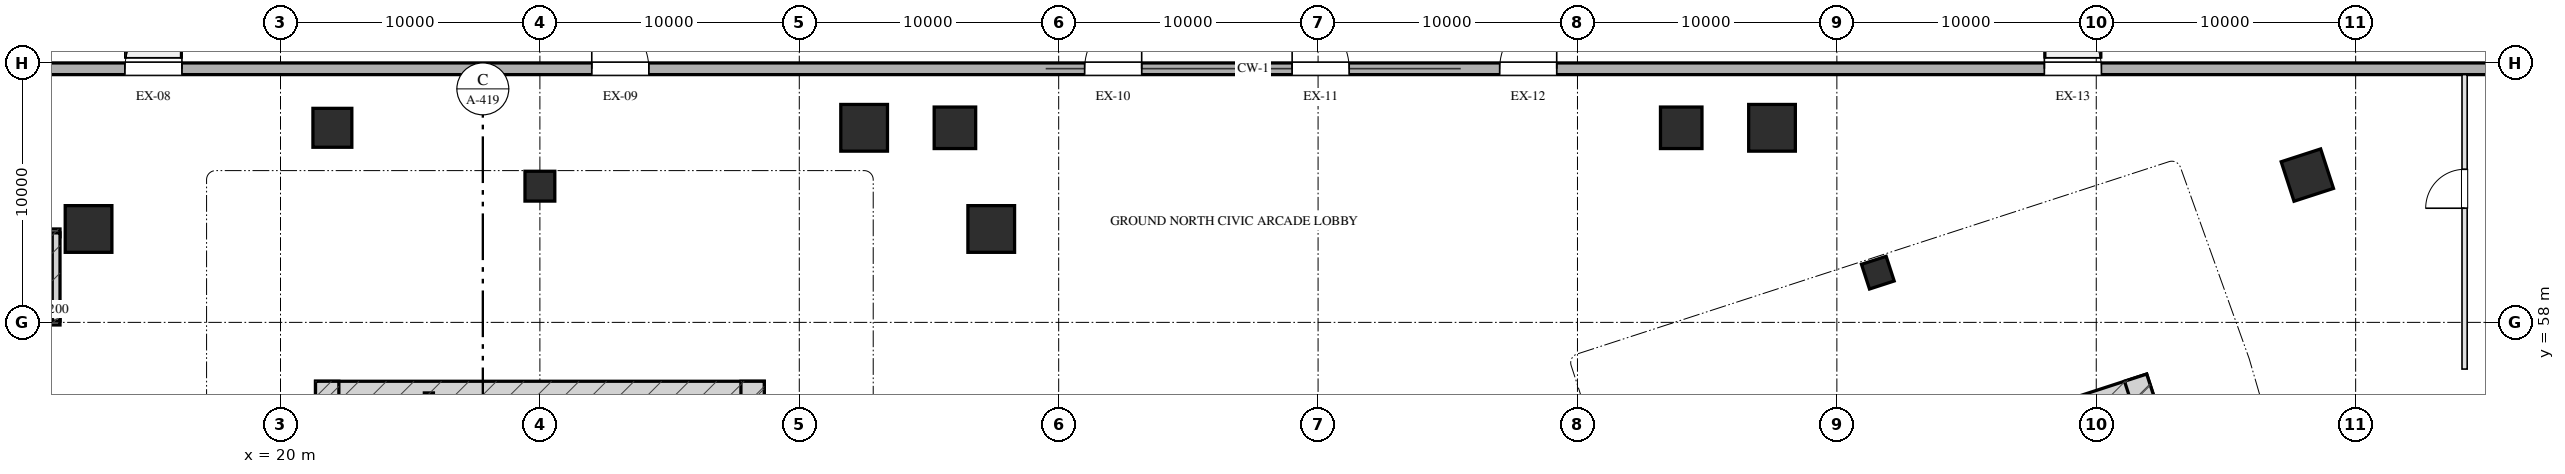
"""IFC4 building model, lengths in metres.
Left out: names, types, materials, properties, quantities, classifications, styles, units other than length and angle.
Written with IfcOpenShell. Run it as: python <this file> out.ifc"""

import sys

from ifc_helpers import new_model, si_unit, direction, frame, frame_2d, origin, origin_2d, place, context, subcontext, project, spatial, rectangle, hollow_rectangle, extrude, element, fill, save


model = new_model("IFC4")
c1 = context("Model", 3, precision=1e-05, world=origin(), true_north=direction((0.0, 1.0)))
c2 = subcontext(c1, "Body", "Model", "MODEL_VIEW")
j1 = project(units=[si_unit("LENGTHUNIT", "METRE"), si_unit("PLANEANGLEUNIT", "RADIAN")], contexts=[c1])
p1 = place(None, origin())
s1 = spatial("IfcSite", under=j1, at=p1, CompositionType="ELEMENT")
p2 = place(p1, origin())
s2 = spatial("IfcBuilding", under=s1, at=p2, CompositionType="ELEMENT")
p3 = place(p2, origin())
s3 = spatial("IfcBuildingStorey", under=s2, at=p3, CompositionType="ELEMENT", Elevation=0.0)
p4 = place(p3, frame((21.35, 55.28, 0.0), z_axis=(0.0, 0.0, 1.0), x_axis=(1.0, 0.0, 0.0)))
e1 = element("IfcWall", 1, at=p4, inside=s3, PredefinedType="SHEAR", context=c2, shape_type="SweptSolid", body=[
    extrude(rectangle(XDim=17.3, YDim=0.9, at=frame_2d((8.65, 0.0))), origin(), (0.0, 0.0, 1.0), 6.0),
])
for number, where, z_axis, x_axis in (
    (2, (21.8, 45.95, 0.0), (0.0, 0.0, 1.0), (0.0, 1.0, 0.0)),
    (3, (38.2, 45.95, 0.0), (0.0, 0.0, 1.0), (0.0, 1.0, 0.0)),
):
    element("IfcWall", number, at=place(p3, frame(where, z_axis=z_axis, x_axis=x_axis)), inside=s3, PredefinedType="SHEAR", context=c2, shape_type="SweptSolid", body=[
        extrude(rectangle(XDim=9.78, YDim=0.9, at=frame_2d((4.89, 0.0))), origin(), (0.0, 0.0, 1.0), 6.0),
    ])
p5 = place(p3, frame((25.72, 48.3, 0.0), z_axis=(0.0, 0.0, 1.0), x_axis=(0.0, 1.0, 0.0)))
e4 = element("IfcWall", 4, at=p5, inside=s3, PredefinedType="SHEAR", context=c2, shape_type="SweptSolid", body=[
    extrude(rectangle(XDim=6.98, YDim=0.35, at=frame_2d((3.49, 0.0))), origin(), (0.0, 0.0, 1.0), 6.0),
])
p6 = place(p3, frame((76.201, 50.419, 0.0), z_axis=(0.0, 0.0, 1.0), x_axis=(0.951056412142, 0.309017314926, 0.0)))
e5 = element("IfcWall", 5, at=p6, inside=s3, PredefinedType="SHEAR", context=c2, shape_type="SweptSolid", body=[
    extrude(rectangle(XDim=16.7, YDim=0.9, at=frame_2d((8.35, 0.0))), origin(), (0.0, 0.0, 1.0), 6.0),
])
p7 = place(p3, frame((94.539, 46.568, 0.0), z_axis=(0.0, 0.0, 1.0), x_axis=(-0.309021722829, 0.951054979914, 0.0)))
e6 = element("IfcWall", 6, at=p7, inside=s3, PredefinedType="SHEAR", context=c2, shape_type="SweptSolid", body=[
    extrude(rectangle(XDim=9.78, YDim=0.9, at=frame_2d((4.89, 0.0))), origin(), (0.0, 0.0, 1.0), 6.0),
])
for number, where, z_axis, x_axis in (
    (7, (2.6, 58.05, 0.0), (0.0, 0.0, 1.0), (1.0, 0.0, 0.0)),
    (8, (2.6, 61.45, 0.0), (0.0, 0.0, 1.0), (1.0, 0.0, 0.0)),
):
    element("IfcWall", number, at=place(p3, frame(where, z_axis=z_axis, x_axis=x_axis)), inside=s3, PredefinedType="SHEAR", context=c2, shape_type="SweptSolid", body=[
        extrude(rectangle(XDim=8.9, YDim=0.3, at=frame_2d((4.45, 0.0))), origin(), (0.0, 0.0, 1.0), 6.0),
    ])
p8 = place(p3, frame((11.35, 58.05, 0.0), z_axis=(0.0, 0.0, 1.0), x_axis=(0.0, 1.0, 0.0)))
e9 = element("IfcWall", 9, at=p8, inside=s3, PredefinedType="SHEAR", context=c2, shape_type="SweptSolid", body=[
    extrude(rectangle(XDim=3.4, YDim=0.3, at=frame_2d((1.7, 0.0))), origin(), (0.0, 0.0, 1.0), 6.0),
])
p9 = place(p3, frame((22.0, 65.5, 0.0), z_axis=(0.0, 0.0, 1.0), x_axis=(1.0, 0.0, 0.0)))
e10 = element("IfcColumn", 10, at=p9, inside=s3, PredefinedType="COLUMN", context=c2, shape_type="SweptSolid", body=[
    extrude(rectangle(XDim=1.5, YDim=1.5, at=origin_2d()), origin(), (0.0, 0.0, 1.0), 6.001),
])
for number, where, z_axis, x_axis in (
    (11, (42.5, 65.5, 0.0), (0.0, 0.0, 1.0), (1.0, 0.0, 0.0)),
    (12, (77.5, 65.5, 0.0), (0.0, 0.0, 1.0), (1.0, 0.0, 0.0)),
):
    element("IfcColumn", number, at=place(p3, frame(where, z_axis=z_axis, x_axis=x_axis)), inside=s3, PredefinedType="COLUMN", context=c2, shape_type="SweptSolid", body=[
        extrude(hollow_rectangle(XDim=1.8, YDim=1.8, WallThickness=0.06, at=origin_2d()), origin(), (0.0, 0.0, 1.0), 6.001),
    ])
for number, where, z_axis, x_axis in (
    (13, (46.0, 65.5, 0.0), (0.0, 0.0, 1.0), (1.0, 0.0, 0.0)),
    (14, (74.0, 65.5, 0.0), (0.0, 0.0, 1.0), (1.0, 0.0, 0.0)),
):
    element("IfcColumn", number, at=place(p3, frame(where, z_axis=z_axis, x_axis=x_axis)), inside=s3, PredefinedType="COLUMN", context=c2, shape_type="SweptSolid", body=[
        extrude(hollow_rectangle(XDim=1.6, YDim=1.6, WallThickness=0.055, at=origin_2d()), origin(), (0.0, 0.0, 1.0), 6.001),
    ])
for number, where, z_axis, x_axis in (
    (15, (47.4, 61.6, 0.0), (0.0, 0.0, 1.0), (1.0, 0.0, 0.0)),
    (16, (12.6, 61.6, 0.0), (0.0, 0.0, 1.0), (1.0, 0.0, 0.0)),
):
    element("IfcColumn", number, at=place(p3, frame(where, z_axis=z_axis, x_axis=x_axis)), inside=s3, PredefinedType="COLUMN", context=c2, shape_type="SweptSolid", body=[
        extrude(hollow_rectangle(XDim=1.8, YDim=1.8, WallThickness=0.06, at=origin_2d()), origin(), (0.0, 0.0, 1.0), 6.001),
    ])
p10 = place(p3, frame((30.0, 63.25, 0.0), z_axis=(0.0, 0.0, 1.0), x_axis=(1.0, 0.0, 0.0)))
e17 = element("IfcColumn", 17, at=p10, inside=s3, PredefinedType="COLUMN", context=c2, shape_type="SweptSolid", body=[
    extrude(hollow_rectangle(XDim=1.15, YDim=1.15, WallThickness=0.04, at=origin_2d()), origin(), (0.0, 0.0, 1.0), 6.001),
])
p11 = place(p3, frame((98.137, 63.677, 0.0), z_axis=(0.0, 0.0, 1.0), x_axis=(0.951056516295, 0.309016994375, 0.0)))
e18 = element("IfcColumn", 18, at=p11, inside=s3, PredefinedType="COLUMN", context=c2, shape_type="SweptSolid", body=[
    extrude(hollow_rectangle(XDim=1.6, YDim=1.6, WallThickness=0.055, at=origin_2d()), origin(), (0.0, 0.0, 1.0), 6.001),
])
p12 = place(p3, frame((81.579, 59.916, 0.0), z_axis=(0.0, 0.0, 1.0), x_axis=(0.951056516295, 0.309016994375, 0.0)))
e19 = element("IfcColumn", 19, at=p12, inside=s3, PredefinedType="COLUMN", context=c2, shape_type="SweptSolid", body=[
    extrude(hollow_rectangle(XDim=1.0, YDim=1.0, WallThickness=0.036, at=origin_2d()), origin(), (0.0, 0.0, 1.0), 6.001),
])
p13 = place(p3, frame((0.0, 67.775, 0.0), z_axis=(0.0, 0.0, 1.0), x_axis=(1.0, 0.0, 0.0)))
e20 = element("IfcWall", 20, at=p13, inside=s3, PredefinedType="SOLIDWALL", context=c2, shape_type="SweptSolid", body=[
    extrude(rectangle(XDim=120.0, YDim=0.45, at=frame_2d((60.0, 0.0))), origin(), (0.0, 0.0, 1.0), 5.7),
])
p14 = place(p13, frame((14.0, 0.0, 0.0)))
e21 = element("IfcOpeningElement", 21, at=p14, cuts=e20, PredefinedType="OPENING", context=c2, shape_type="SweptSolid", body=[
    extrude(rectangle(XDim=2.2, YDim=2.4, at=frame_2d((1.1, 1.2))), frame((0.0, 0.235, 0.0), z_axis=(0.0, -1.0, 0.0), x_axis=(1.0, 0.0, 0.0)), (0.0, 0.0, 1.0), 0.47),
])
p15 = place(p13, frame((32.0, 0.0, 0.0)))
e22 = element("IfcOpeningElement", 22, at=p15, cuts=e20, PredefinedType="OPENING", context=c2, shape_type="SweptSolid", body=[
    extrude(rectangle(XDim=2.2, YDim=2.4, at=frame_2d((1.1, 1.2))), frame((0.0, 0.235, 0.0), z_axis=(0.0, -1.0, 0.0), x_axis=(1.0, 0.0, 0.0)), (0.0, 0.0, 1.0), 0.47),
])
p16 = place(p13, frame((51.0, 0.0, 0.0)))
e23 = element("IfcOpeningElement", 23, at=p16, cuts=e20, PredefinedType="OPENING", context=c2, shape_type="SweptSolid", body=[
    extrude(rectangle(XDim=2.2, YDim=2.4, at=frame_2d((1.1, 1.2))), frame((0.0, 0.235, 0.0), z_axis=(0.0, -1.0, 0.0), x_axis=(1.0, 0.0, 0.0)), (0.0, 0.0, 1.0), 0.47),
])
p17 = place(p13, frame((59.0, 0.0, 0.0)))
e24 = element("IfcOpeningElement", 24, at=p17, cuts=e20, PredefinedType="OPENING", context=c2, shape_type="SweptSolid", body=[
    extrude(rectangle(XDim=2.2, YDim=2.4, at=frame_2d((1.1, 1.2))), frame((0.0, 0.235, 0.0), z_axis=(0.0, -1.0, 0.0), x_axis=(1.0, 0.0, 0.0)), (0.0, 0.0, 1.0), 0.47),
])
p18 = place(p13, frame((67.0, 0.0, 0.0)))
e25 = element("IfcOpeningElement", 25, at=p18, cuts=e20, PredefinedType="OPENING", context=c2, shape_type="SweptSolid", body=[
    extrude(rectangle(XDim=2.2, YDim=2.4, at=frame_2d((1.1, 1.2))), frame((0.0, 0.235, 0.0), z_axis=(0.0, -1.0, 0.0), x_axis=(1.0, 0.0, 0.0)), (0.0, 0.0, 1.0), 0.47),
])
p19 = place(p13, frame((88.0, 0.0, 0.0)))
e26 = element("IfcOpeningElement", 26, at=p19, cuts=e20, PredefinedType="OPENING", context=c2, shape_type="SweptSolid", body=[
    extrude(rectangle(XDim=2.2, YDim=2.4, at=frame_2d((1.1, 1.2))), frame((0.0, 0.235, 0.0), z_axis=(0.0, -1.0, 0.0), x_axis=(1.0, 0.0, 0.0)), (0.0, 0.0, 1.0), 0.47),
])
p20 = place(p13, frame((112.0, 0.0, 0.0)))
e27 = element("IfcOpeningElement", 27, at=p20, cuts=e20, PredefinedType="OPENING", context=c2, shape_type="SweptSolid", body=[
    extrude(rectangle(XDim=2.2, YDim=2.4, at=frame_2d((1.1, 1.2))), frame((0.0, 0.235, 0.0), z_axis=(0.0, -1.0, 0.0), x_axis=(1.0, 0.0, 0.0)), (0.0, 0.0, 1.0), 0.47),
])
p21 = place(p3, frame((104.2, 56.2, 0.0), z_axis=(0.0, 0.0, 1.0), x_axis=(0.0, 1.0, 0.0)))
e28 = element("IfcWall", 28, at=p21, inside=s3, PredefinedType="PARTITIONING", context=c2, shape_type="SweptSolid", body=[
    extrude(rectangle(XDim=11.35, YDim=0.2, at=frame_2d((5.675, 0.0))), origin(), (0.0, 0.0, 1.0), 5.685),
])
p22 = place(p21, frame((6.2, 0.0, 0.0)))
e29 = element("IfcOpeningElement", 29, at=p22, cuts=e28, PredefinedType="OPENING", context=c2, shape_type="SweptSolid", body=[
    extrude(rectangle(XDim=1.5, YDim=2.05, at=frame_2d((0.75, 1.025))), frame((0.0, 0.11, 0.0), z_axis=(0.0, -1.0, 0.0), x_axis=(1.0, 0.0, 0.0)), (0.0, 0.0, 1.0), 0.22),
])
p23 = place(p14, origin())
e30 = element("IfcDoor", 30, at=p23, inside=s3, OperationType="SINGLE_SWING_RIGHT", PredefinedType="DOOR", context=c2, shape_type="SweptSolid", body=[
    extrude(rectangle(XDim=2.2, YDim=2.4, at=frame_2d((1.1, 1.2))), frame((0.0, 0.025, 0.0), z_axis=(0.0, -1.0, 0.0), x_axis=(1.0, 0.0, 0.0)), (0.0, 0.0, 1.0), 0.05),
])
fill(e21, e30)
p24 = place(p15, origin())
e31 = element("IfcDoor", 31, at=p24, inside=s3, OperationType="SINGLE_SWING_LEFT", PredefinedType="DOOR", context=c2, shape_type="SweptSolid", body=[
    extrude(rectangle(XDim=2.2, YDim=2.4, at=frame_2d((1.1, 1.2))), frame((0.0, 0.025, 0.0), z_axis=(0.0, -1.0, 0.0), x_axis=(1.0, 0.0, 0.0)), (0.0, 0.0, 1.0), 0.05),
])
fill(e22, e31)
p25 = place(p16, origin())
e32 = element("IfcDoor", 32, at=p25, inside=s3, OperationType="SINGLE_SWING_RIGHT", PredefinedType="DOOR", context=c2, shape_type="SweptSolid", body=[
    extrude(rectangle(XDim=2.2, YDim=2.4, at=frame_2d((1.1, 1.2))), frame((0.0, 0.025, 0.0), z_axis=(0.0, -1.0, 0.0), x_axis=(1.0, 0.0, 0.0)), (0.0, 0.0, 1.0), 0.05),
])
fill(e23, e32)
p26 = place(p17, origin())
e33 = element("IfcDoor", 33, at=p26, inside=s3, OperationType="SINGLE_SWING_LEFT", PredefinedType="DOOR", context=c2, shape_type="SweptSolid", body=[
    extrude(rectangle(XDim=2.2, YDim=2.4, at=frame_2d((1.1, 1.2))), frame((0.0, 0.025, 0.0), z_axis=(0.0, -1.0, 0.0), x_axis=(1.0, 0.0, 0.0)), (0.0, 0.0, 1.0), 0.05),
])
fill(e24, e33)
p27 = place(p18, origin())
e34 = element("IfcDoor", 34, at=p27, inside=s3, OperationType="SINGLE_SWING_RIGHT", PredefinedType="DOOR", context=c2, shape_type="SweptSolid", body=[
    extrude(rectangle(XDim=2.2, YDim=2.4, at=frame_2d((1.1, 1.2))), frame((0.0, 0.025, 0.0), z_axis=(0.0, -1.0, 0.0), x_axis=(1.0, 0.0, 0.0)), (0.0, 0.0, 1.0), 0.05),
])
fill(e25, e34)
p28 = place(p19, origin())
e35 = element("IfcDoor", 35, at=p28, inside=s3, OperationType="SINGLE_SWING_LEFT", PredefinedType="DOOR", context=c2, shape_type="SweptSolid", body=[
    extrude(rectangle(XDim=2.2, YDim=2.4, at=frame_2d((1.1, 1.2))), frame((0.0, 0.025, 0.0), z_axis=(0.0, -1.0, 0.0), x_axis=(1.0, 0.0, 0.0)), (0.0, 0.0, 1.0), 0.05),
])
fill(e26, e35)
p29 = place(p22, origin())
e36 = element("IfcDoor", 36, at=p29, inside=s3, OperationType="SINGLE_SWING_LEFT", PredefinedType="DOOR", context=c2, shape_type="SweptSolid", body=[
    extrude(rectangle(XDim=1.5, YDim=2.05, at=frame_2d((0.75, 1.025))), frame((0.0, 0.025, 0.0), z_axis=(0.0, -1.0, 0.0), x_axis=(1.0, 0.0, 0.0)), (0.0, 0.0, 1.0), 0.05),
])
fill(e29, e36)
save(model, sys.argv[1])
